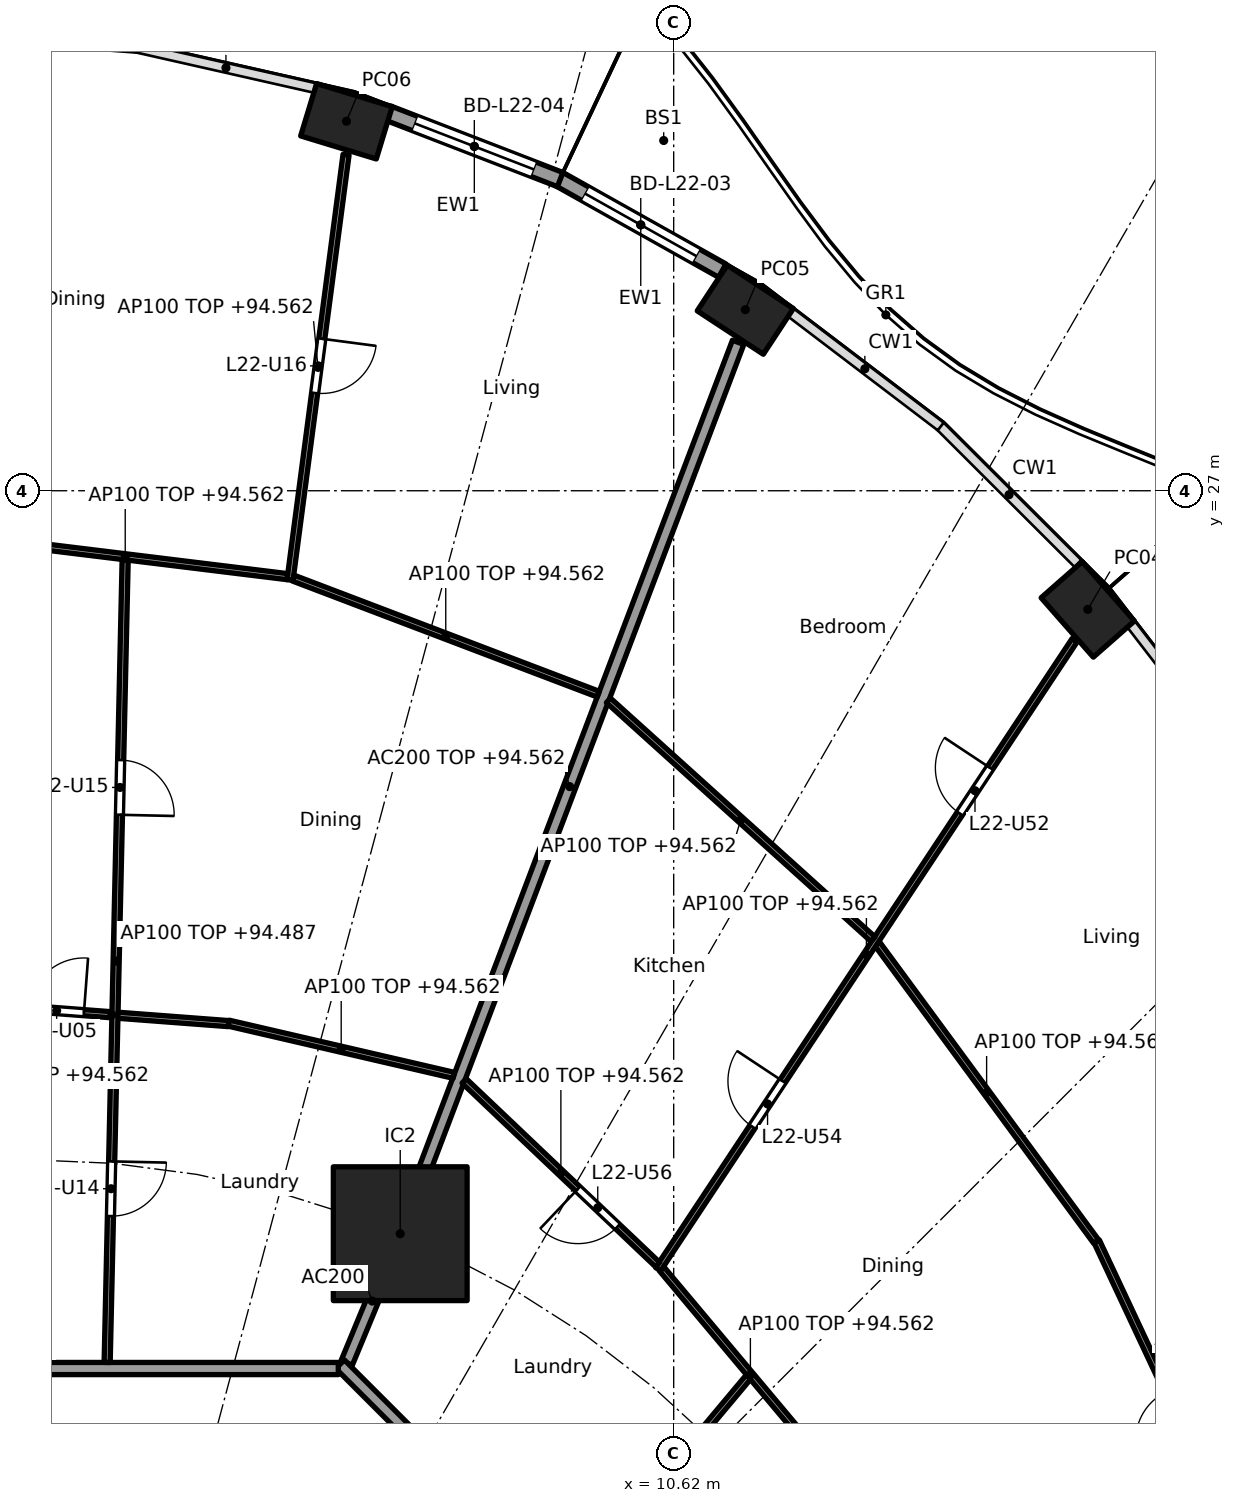
"""IFC4 building model, lengths in metres.
Left out: names, types, materials, properties, quantities, classifications, styles, units other than length and angle.
Written with IfcOpenShell. Run it as: python <this file> out.ifc"""

import sys

from ifc_helpers import new_model, si_unit, direction, frame, frame_2d, origin, origin_2d, place, context, subcontext, project, spatial, rectangle, hollow_rectangle, extrude, element, fill, save


model = new_model("IFC4")
c1 = context("Model", 3, precision=1e-05, world=origin(), true_north=direction((0.0, 1.0)))
c2 = subcontext(c1, "Body", "Model", "MODEL_VIEW")
j1 = project(units=[si_unit("LENGTHUNIT", "METRE"), si_unit("PLANEANGLEUNIT", "RADIAN")], contexts=[c1])
p1 = place(None, origin())
s1 = spatial("IfcSite", under=j1, at=p1, CompositionType="ELEMENT")
p2 = place(p1, origin())
s2 = spatial("IfcBuilding", under=s1, at=p2, CompositionType="ELEMENT")
p3 = place(p2, frame((0.0, 0.0, 91.8)))
s3 = spatial("IfcBuildingStorey", under=s2, at=p3, CompositionType="ELEMENT", Elevation=91.8)
for number, where, z_axis, x_axis in (
    (1, (17.43, 25.049, 0.0), (0.0, 0.0, 1.0), (-0.66, 0.751, 0.0)),
    (2, (11.798, 29.978, 0.0), (0.0, 0.0, 1.0), (-0.836, 0.549, 0.0)),
    (3, (5.239, 33.076, 0.0), (0.0, 0.0, 1.0), (-0.957, 0.292, 0.0)),
):
    element("IfcColumn", number, at=place(p3, frame(where, z_axis=z_axis, x_axis=x_axis)), inside=s3, PredefinedType="COLUMN", context=c2, shape_type="SweptSolid", body=[
        extrude(hollow_rectangle(XDim=1.3, YDim=0.9, WallThickness=0.045, at=origin_2d()), origin(), (0.0, 0.0, 1.0), 3.7),
    ])
p4 = place(p3, frame((6.123, 14.782, 0.0), z_axis=(0.0, 0.0, 1.0), x_axis=(1.0, 0.0, 0.0)))
e4 = element("IfcColumn", 4, at=p4, inside=s3, PredefinedType="COLUMN", context=c2, shape_type="SweptSolid", body=[
    extrude(rectangle(XDim=2.2, YDim=2.2, at=origin_2d()), origin(), (0.0, 0.0, 1.0), 3.7),
])
p5 = place(p3, frame((8.737, 32.125, 0.0), z_axis=(0.0, 0.0, 1.0), x_axis=(0.872071158476, -0.489379090843, 0.0)))
e5 = element("IfcWall", 5, at=p5, inside=s3, PredefinedType="SOLIDWALL", context=c2, shape_type="SweptSolid", body=[
    extrude(rectangle(XDim=3.076, YDim=0.25, at=frame_2d((1.538, 0.0))), origin(), (0.0, 0.0, 1.0), 3.44),
])
p6 = place(p5, frame((0.488, 0.0, 0.0)))
e6 = element("IfcOpeningElement", 6, at=p6, cuts=e5, PredefinedType="OPENING", context=c2, shape_type="SweptSolid", body=[
    extrude(rectangle(XDim=2.1, YDim=2.4, at=frame_2d((1.05, 1.2))), frame((0.0, 0.135, 0.0), z_axis=(0.0, -1.0, 0.0), x_axis=(1.0, 0.0, 0.0)), (0.0, 0.0, 1.0), 0.27),
])
p7 = place(p3, frame((5.929, 33.208, 0.0), z_axis=(0.0, 0.0, 1.0), x_axis=(0.932837560624, -0.360297218263, 0.0)))
e7 = element("IfcWall", 7, at=p7, inside=s3, PredefinedType="SOLIDWALL", context=c2, shape_type="SweptSolid", body=[
    extrude(rectangle(XDim=3.028, YDim=0.25, at=frame_2d((1.514, 0.0))), origin(), (0.0, 0.0, 1.0), 3.44),
])
p8 = place(p7, frame((0.464, 0.0, 0.0)))
e8 = element("IfcOpeningElement", 8, at=p8, cuts=e7, PredefinedType="OPENING", context=c2, shape_type="SweptSolid", body=[
    extrude(rectangle(XDim=2.1, YDim=2.4, at=frame_2d((1.05, 1.2))), frame((0.0, 0.135, 0.0), z_axis=(0.0, -1.0, 0.0), x_axis=(1.0, 0.0, 0.0)), (0.0, 0.0, 1.0), 0.27),
])
p9 = place(p3, frame((5.243, 12.657, 0.0), z_axis=(0.0, 0.0, 1.0), x_axis=(0.382724096228, 0.923862687939, 0.0)))
e9 = element("IfcWall", 9, at=p9, inside=s3, PredefinedType="PARTITIONING", context=c2, shape_type="SweptSolid", body=[
    extrude(rectangle(XDim=2.201, YDim=0.2, at=frame_2d((1.1, 0.0))), origin(), (0.0, 0.0, 1.0), 3.44),
])
p10 = place(p3, frame((6.141, 14.829, 0.0), z_axis=(0.0, 0.0, 1.0), x_axis=(0.354477134193, 0.935064682968, 0.0)))
e10 = element("IfcWall", 10, at=p10, inside=s3, PredefinedType="PARTITIONING", context=c2, shape_type="SweptSolid", body=[
    extrude(rectangle(XDim=15.626, YDim=0.2, at=frame_2d((7.813, 0.0))), origin(), (0.0, 0.0, 1.0), 2.762),
])
p11 = place(p3, frame((12.635, 5.134, 0.0), z_axis=(0.0, 0.0, 1.0), x_axis=(-0.707106781187, 0.707106781187, 0.0)))
e11 = element("IfcWall", 11, at=p11, inside=s3, PredefinedType="PARTITIONING", context=c2, shape_type="SweptSolid", body=[
    extrude(rectangle(XDim=10.609, YDim=0.2, at=frame_2d((5.305, 0.0))), origin(), (0.0, 0.0, 1.0), 3.44),
])
p12 = place(p3, frame((5.104, 12.565, 0.0), z_axis=(0.0, 0.0, 1.0), x_axis=(-1.0, 0.0, 0.0)))
e12 = element("IfcWall", 12, at=p12, inside=s3, PredefinedType="PARTITIONING", context=c2, shape_type="SweptSolid", body=[
    extrude(rectangle(XDim=10.409, YDim=0.2, at=frame_2d((5.205, 0.0))), origin(), (0.0, 0.0, 1.0), 3.44),
])
p13 = place(p12, frame((8.508, 0.0, 0.0)))
e13 = element("IfcOpeningElement", 13, at=p13, cuts=e12, PredefinedType="OPENING", context=c2, shape_type="SweptSolid", body=[
    extrude(rectangle(XDim=1.0, YDim=2.1, at=frame_2d((0.5, 1.05))), frame((0.0, 0.11, 0.0), z_axis=(0.0, -1.0, 0.0), x_axis=(1.0, 0.0, 0.0)), (0.0, 0.0, 1.0), 0.22),
])
p14 = place(p3, frame((20.252, 8.95, 0.0), z_axis=(0.0, 0.0, 1.0), x_axis=(-0.424580709335, 0.905390093419, 0.0)))
e14 = element("IfcWall", 14, at=p14, inside=s3, PredefinedType="PARTITIONING", context=c2, shape_type="SweptSolid", body=[
    extrude(rectangle(XDim=6.304, YDim=0.1, at=frame_2d((3.152, 0.0))), origin(), (0.0, 0.0, 1.0), 2.762),
])
p15 = place(p14, frame((2.677, 0.0, 0.0)))
e15 = element("IfcOpeningElement", 15, at=p15, cuts=e14, PredefinedType="OPENING", context=c2, shape_type="SweptSolid", body=[
    extrude(rectangle(XDim=0.9, YDim=2.1, at=frame_2d((0.45, 1.05))), frame((0.0, 0.06, 0.0), z_axis=(0.0, -1.0, 0.0), x_axis=(1.0, 0.0, 0.0)), (0.0, 0.0, 1.0), 0.12),
])
p16 = place(p3, frame((13.339, 10.725, 0.0), z_axis=(0.0, 0.0, 1.0), x_axis=(-0.642515455924, 0.766272724882, 0.0)))
e16 = element("IfcWall", 16, at=p16, inside=s3, PredefinedType="PARTITIONING", context=c2, shape_type="SweptSolid", body=[
    extrude(rectangle(XDim=4.537, YDim=0.1, at=frame_2d((2.269, 0.0))), origin(), (0.0, 0.0, 1.0), 2.762),
])
p17 = place(p3, frame((17.567, 14.653, 0.0), z_axis=(0.0, 0.0, 1.0), x_axis=(-0.592391983588, 0.80564988536, 0.0)))
e17 = element("IfcWall", 17, at=p17, inside=s3, PredefinedType="PARTITIONING", context=c2, shape_type="SweptSolid", body=[
    extrude(rectangle(XDim=6.08, YDim=0.1, at=frame_2d((3.04, 0.0))), origin(), (0.0, 0.0, 1.0), 2.762),
])
p18 = place(p3, frame((8.949, 8.961, 0.0), z_axis=(0.0, 0.0, 1.0), x_axis=(0.642048217601, 0.766664259162, 0.0)))
e18 = element("IfcWall", 18, at=p18, inside=s3, PredefinedType="PARTITIONING", context=c2, shape_type="SweptSolid", body=[
    extrude(rectangle(XDim=4.518, YDim=0.1, at=frame_2d((2.259, 0.0))), origin(), (0.0, 0.0, 1.0), 2.687),
])
p19 = place(p3, frame((10.364, 14.198, 0.0), z_axis=(0.0, 0.0, 1.0), x_axis=(0.552104552927, 0.833774887267, 0.0)))
e19 = element("IfcWall", 19, at=p19, inside=s3, PredefinedType="PARTITIONING", context=c2, shape_type="SweptSolid", body=[
    extrude(rectangle(XDim=12.407, YDim=0.1, at=frame_2d((6.203, 0.0))), origin(), (0.0, 0.0, 1.0), 2.762),
])
p20 = place(p19, frame((8.988, 0.0, 0.0)))
e20 = element("IfcOpeningElement", 20, at=p20, cuts=e19, PredefinedType="OPENING", context=c2, shape_type="SweptSolid", body=[
    extrude(rectangle(XDim=0.9, YDim=2.1, at=frame_2d((0.45, 1.05))), frame((0.0, 0.06, 0.0), z_axis=(0.0, -1.0, 0.0), x_axis=(1.0, 0.0, 0.0)), (0.0, 0.0, 1.0), 0.12),
])
p21 = place(p19, frame((2.809, 0.0, 0.0)))
e21 = element("IfcOpeningElement", 21, at=p21, cuts=e19, PredefinedType="OPENING", context=c2, shape_type="SweptSolid", body=[
    extrude(rectangle(XDim=0.9, YDim=2.1, at=frame_2d((0.45, 1.05))), frame((0.0, 0.06, 0.0), z_axis=(0.0, -1.0, 0.0), x_axis=(1.0, 0.0, 0.0)), (0.0, 0.0, 1.0), 0.12),
])
p22 = place(p3, frame((10.355, 14.274, 0.0), z_axis=(0.0, 0.0, 1.0), x_axis=(-0.725206433622, 0.688531501555, 0.0)))
e22 = element("IfcWall", 22, at=p22, inside=s3, PredefinedType="PARTITIONING", context=c2, shape_type="SweptSolid", body=[
    extrude(rectangle(XDim=4.387, YDim=0.1, at=frame_2d((2.193, 0.0))), origin(), (0.0, 0.0, 1.0), 2.762),
])
p23 = place(p22, frame((0.907, 0.0, 0.0)))
e23 = element("IfcOpeningElement", 23, at=p23, cuts=e22, PredefinedType="OPENING", context=c2, shape_type="SweptSolid", body=[
    extrude(rectangle(XDim=0.9, YDim=2.1, at=frame_2d((0.45, 1.05))), frame((0.0, 0.06, 0.0), z_axis=(0.0, -1.0, 0.0), x_axis=(1.0, 0.0, 0.0)), (0.0, 0.0, 1.0), 0.12),
])
p24 = place(p3, frame((13.898, 19.625, 0.0), z_axis=(0.0, 0.0, 1.0), x_axis=(-0.742396654702, 0.669960601146, 0.0)))
e24 = element("IfcWall", 24, at=p24, inside=s3, PredefinedType="PARTITIONING", context=c2, shape_type="SweptSolid", body=[
    extrude(rectangle(XDim=5.861, YDim=0.1, at=frame_2d((2.931, 0.0))), origin(), (0.0, 0.0, 1.0), 2.762),
])
p25 = place(p3, frame((7.004, 17.386, 0.0), z_axis=(0.0, 0.0, 1.0), x_axis=(-0.974179728512, 0.225773905837, 0.0)))
e25 = element("IfcWall", 25, at=p25, inside=s3, PredefinedType="PARTITIONING", context=c2, shape_type="SweptSolid", body=[
    extrude(rectangle(XDim=3.802, YDim=0.1, at=frame_2d((1.901, 0.0))), origin(), (0.0, 0.0, 1.0), 2.762),
])
p26 = place(p3, frame((9.379, 23.655, 0.0), z_axis=(0.0, 0.0, 1.0), x_axis=(-0.934613076136, 0.355666132653, 0.0)))
e26 = element("IfcWall", 26, at=p26, inside=s3, PredefinedType="PARTITIONING", context=c2, shape_type="SweptSolid", body=[
    extrude(rectangle(XDim=5.366, YDim=0.1, at=frame_2d((2.683, 0.0))), origin(), (0.0, 0.0, 1.0), 2.762),
])
p27 = place(p3, frame((3.299, 18.237, 0.0), z_axis=(0.0, 0.0, 1.0), x_axis=(-0.997152243414, 0.075414875552, 0.0)))
e27 = element("IfcWall", 27, at=p27, inside=s3, PredefinedType="PARTITIONING", context=c2, shape_type="SweptSolid", body=[
    extrude(rectangle(XDim=3.846, YDim=0.1, at=frame_2d((1.923, 0.0))), origin(), (0.0, 0.0, 1.0), 2.762),
])
p28 = place(p27, frame((2.385, 0.0, 0.0)))
e28 = element("IfcOpeningElement", 28, at=p28, cuts=e27, PredefinedType="OPENING", context=c2, shape_type="SweptSolid", body=[
    extrude(rectangle(XDim=0.9, YDim=2.1, at=frame_2d((0.45, 1.05))), frame((0.0, 0.06, 0.0), z_axis=(0.0, -1.0, 0.0), x_axis=(1.0, 0.0, 0.0)), (0.0, 0.0, 1.0), 0.12),
])
p29 = place(p3, frame((4.311, 25.531, 0.0), z_axis=(0.0, 0.0, 1.0), x_axis=(0.130604008227, 0.991434613595, 0.0)))
e29 = element("IfcWall", 29, at=p29, inside=s3, PredefinedType="PARTITIONING", context=c2, shape_type="SweptSolid", body=[
    extrude(rectangle(XDim=7.055, YDim=0.1, at=frame_2d((3.527, 0.0))), origin(), (0.0, 0.0, 1.0), 2.762),
])
p30 = place(p29, frame((3.102, 0.0, 0.0)))
e30 = element("IfcOpeningElement", 30, at=p30, cuts=e29, PredefinedType="OPENING", context=c2, shape_type="SweptSolid", body=[
    extrude(rectangle(XDim=0.9, YDim=2.1, at=frame_2d((0.45, 1.05))), frame((0.0, 0.06, 0.0), z_axis=(0.0, -1.0, 0.0), x_axis=(1.0, 0.0, 0.0)), (0.0, 0.0, 1.0), 0.12),
])
p31 = place(p3, frame((4.267, 25.587, 0.0), z_axis=(0.0, 0.0, 1.0), x_axis=(-0.992576206119, 0.121624319302, 0.0)))
e31 = element("IfcWall", 31, at=p31, inside=s3, PredefinedType="PARTITIONING", context=c2, shape_type="SweptSolid", body=[
    extrude(rectangle(XDim=5.374, YDim=0.1, at=frame_2d((2.687, 0.0))), origin(), (0.0, 0.0, 1.0), 2.762),
])
p32 = place(p3, frame((1.303, 12.665, 0.0), z_axis=(0.0, 0.0, 1.0), x_axis=(0.022412244057, 0.999748814111, 0.0)))
e32 = element("IfcWall", 32, at=p32, inside=s3, PredefinedType="PARTITIONING", context=c2, shape_type="SweptSolid", body=[
    extrude(rectangle(XDim=13.203, YDim=0.1, at=frame_2d((6.601, 0.0))), origin(), (0.0, 0.0, 1.0), 2.687),
])
p33 = place(p32, frame((2.407, 0.0, 0.0)))
e33 = element("IfcOpeningElement", 33, at=p33, cuts=e32, PredefinedType="OPENING", context=c2, shape_type="SweptSolid", body=[
    extrude(rectangle(XDim=0.9, YDim=2.1, at=frame_2d((0.45, 1.05))), frame((0.0, 0.06, 0.0), z_axis=(0.0, -1.0, 0.0), x_axis=(1.0, 0.0, 0.0)), (0.0, 0.0, 1.0), 0.12),
])
p34 = place(p32, frame((9.009, 0.0, 0.0)))
e34 = element("IfcOpeningElement", 34, at=p34, cuts=e32, PredefinedType="OPENING", context=c2, shape_type="SweptSolid", body=[
    extrude(rectangle(XDim=0.9, YDim=2.1, at=frame_2d((0.45, 1.05))), frame((0.0, 0.06, 0.0), z_axis=(0.0, -1.0, 0.0), x_axis=(1.0, 0.0, 0.0)), (0.0, 0.0, 1.0), 0.12),
])
p35 = place(p6, origin())
e35 = element("IfcDoor", 35, at=p35, inside=s3, OperationType="SLIDING_TO_LEFT", PredefinedType="DOOR", context=c2, shape_type="SweptSolid", body=[
    extrude(rectangle(XDim=2.1, YDim=2.4, at=frame_2d((1.05, 1.2))), frame((0.0, 0.025, 0.0), z_axis=(0.0, -1.0, 0.0), x_axis=(1.0, 0.0, 0.0)), (0.0, 0.0, 1.0), 0.05),
])
fill(e6, e35)
p36 = place(p8, origin())
e36 = element("IfcDoor", 36, at=p36, inside=s3, OperationType="SLIDING_TO_LEFT", PredefinedType="DOOR", context=c2, shape_type="SweptSolid", body=[
    extrude(rectangle(XDim=2.1, YDim=2.4, at=frame_2d((1.05, 1.2))), frame((0.0, 0.025, 0.0), z_axis=(0.0, -1.0, 0.0), x_axis=(1.0, 0.0, 0.0)), (0.0, 0.0, 1.0), 0.05),
])
fill(e8, e36)
p37 = place(p28, frame((0.9, 0.0, 0.0), x_axis=(-1.0, 0.0, 0.0)))
e37 = element("IfcDoor", 37, at=p37, inside=s3, OperationType="SINGLE_SWING_RIGHT", PredefinedType="DOOR", context=c2, shape_type="SweptSolid", body=[
    extrude(rectangle(XDim=0.9, YDim=2.1, at=frame_2d((0.45, 1.05))), frame((0.0, 0.025, 0.0), z_axis=(0.0, -1.0, 0.0), x_axis=(1.0, 0.0, 0.0)), (0.0, 0.0, 1.0), 0.05),
])
fill(e28, e37)
p38 = place(p33, frame((0.9, 0.0, 0.0), x_axis=(-1.0, 0.0, 0.0)))
e38 = element("IfcDoor", 38, at=p38, inside=s3, OperationType="SINGLE_SWING_LEFT", PredefinedType="DOOR", context=c2, shape_type="SweptSolid", body=[
    extrude(rectangle(XDim=0.9, YDim=2.1, at=frame_2d((0.45, 1.05))), frame((0.0, 0.025, 0.0), z_axis=(0.0, -1.0, 0.0), x_axis=(1.0, 0.0, 0.0)), (0.0, 0.0, 1.0), 0.05),
])
fill(e33, e38)
p39 = place(p34, frame((0.9, 0.0, 0.0), x_axis=(-1.0, 0.0, 0.0)))
e39 = element("IfcDoor", 39, at=p39, inside=s3, OperationType="SINGLE_SWING_RIGHT", PredefinedType="DOOR", context=c2, shape_type="SweptSolid", body=[
    extrude(rectangle(XDim=0.9, YDim=2.1, at=frame_2d((0.45, 1.05))), frame((0.0, 0.025, 0.0), z_axis=(0.0, -1.0, 0.0), x_axis=(1.0, 0.0, 0.0)), (0.0, 0.0, 1.0), 0.05),
])
fill(e34, e39)
p40 = place(p30, frame((0.9, 0.0, 0.0), x_axis=(-1.0, 0.0, 0.0)))
e40 = element("IfcDoor", 40, at=p40, inside=s3, OperationType="SINGLE_SWING_LEFT", PredefinedType="DOOR", context=c2, shape_type="SweptSolid", body=[
    extrude(rectangle(XDim=0.9, YDim=2.1, at=frame_2d((0.45, 1.05))), frame((0.0, 0.025, 0.0), z_axis=(0.0, -1.0, 0.0), x_axis=(1.0, 0.0, 0.0)), (0.0, 0.0, 1.0), 0.05),
])
fill(e30, e40)
p41 = place(p20, origin())
e41 = element("IfcDoor", 41, at=p41, inside=s3, OperationType="SINGLE_SWING_RIGHT", PredefinedType="DOOR", context=c2, shape_type="SweptSolid", body=[
    extrude(rectangle(XDim=0.9, YDim=2.1, at=frame_2d((0.45, 1.05))), frame((0.0, 0.025, 0.0), z_axis=(0.0, -1.0, 0.0), x_axis=(1.0, 0.0, 0.0)), (0.0, 0.0, 1.0), 0.05),
])
fill(e20, e41)
p42 = place(p21, origin())
e42 = element("IfcDoor", 42, at=p42, inside=s3, OperationType="SINGLE_SWING_RIGHT", PredefinedType="DOOR", context=c2, shape_type="SweptSolid", body=[
    extrude(rectangle(XDim=0.9, YDim=2.1, at=frame_2d((0.45, 1.05))), frame((0.0, 0.025, 0.0), z_axis=(0.0, -1.0, 0.0), x_axis=(1.0, 0.0, 0.0)), (0.0, 0.0, 1.0), 0.05),
])
fill(e21, e42)
p43 = place(p23, origin())
e43 = element("IfcDoor", 43, at=p43, inside=s3, OperationType="SINGLE_SWING_RIGHT", PredefinedType="DOOR", context=c2, shape_type="SweptSolid", body=[
    extrude(rectangle(XDim=0.9, YDim=2.1, at=frame_2d((0.45, 1.05))), frame((0.0, 0.025, 0.0), z_axis=(0.0, -1.0, 0.0), x_axis=(1.0, 0.0, 0.0)), (0.0, 0.0, 1.0), 0.05),
])
fill(e23, e43)
save(model, sys.argv[1])
